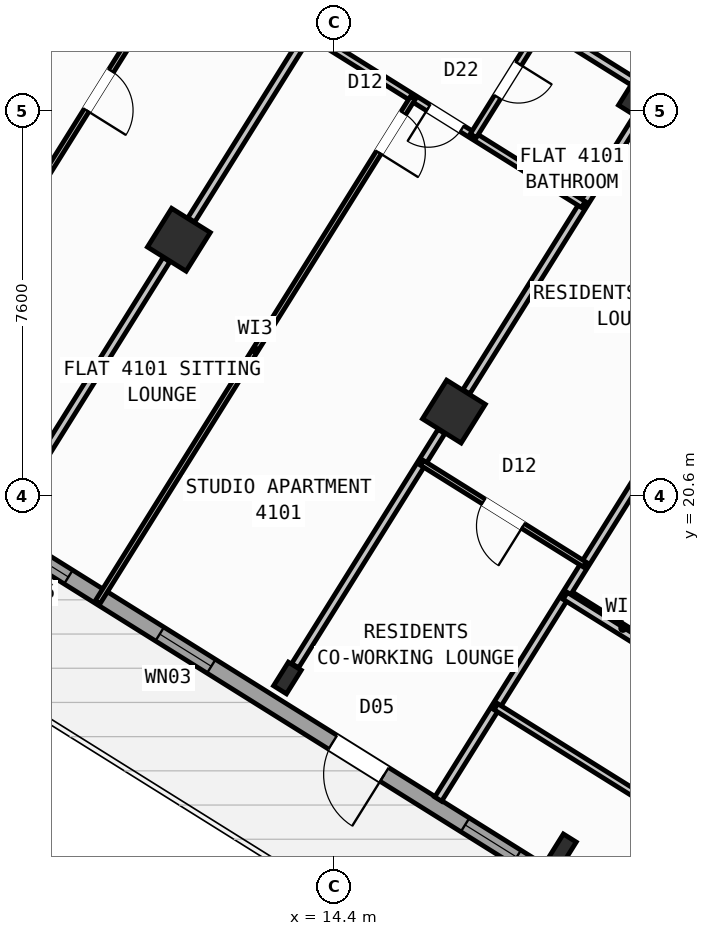
"""IFC4 building model, lengths in metres.
Left out: names, types, materials, properties, quantities, classifications, styles, units other than length and angle.
Written with IfcOpenShell. Run it as: python <this file> out.ifc"""

import sys

from ifc_helpers import new_model, si_unit, direction, frame, frame_2d, origin, origin_2d, place, context, subcontext, project, spatial, rectangle, hollow_rectangle, i_section, extrude, source, transform, mapped, element, fill, save


model = new_model("IFC4")
c1 = context("Model", 3, precision=1e-05, world=origin(), true_north=direction((0.0, 1.0)))
c2 = subcontext(c1, "Body", "Model", "MODEL_VIEW")
j1 = project(units=[si_unit("LENGTHUNIT", "METRE"), si_unit("PLANEANGLEUNIT", "RADIAN")], contexts=[c1])
p1 = place(None, origin())
s1 = spatial("IfcSite", under=j1, at=p1, CompositionType="ELEMENT")
p2 = place(p1, origin())
s2 = spatial("IfcBuilding", under=s1, at=p2, CompositionType="ELEMENT")
p3 = place(p2, frame((0.0, 0.0, 162.3)))
s3 = spatial("IfcBuildingStorey", under=s2, at=p3, CompositionType="ELEMENT", Elevation=162.3)
m1 = source(origin(), c2, "Body", "SweptSolid", [
    extrude(i_section(OverallWidth=0.3, OverallDepth=0.55, WebThickness=0.015, FlangeThickness=0.029, at=origin_2d()), origin(), (0.0, 0.0, 1.0), 3.6),
])
p4 = place(p3, frame((18.906, 13.612, 0.0), z_axis=(0.0, 0.0, 1.0), x_axis=(-0.848048096156, 0.529919264233, 0.0)))
e1 = element("IfcColumn", 1, at=p4, inside=s3, PredefinedType="COLUMN", context=c2, shape_type="MappedRepresentation", body=[
    mapped(m1, transform((0.0, 0.0, 0.0), scale=1.0)),
])
m2 = source(origin(), c2, "Body", "SweptSolid", [
    extrude(hollow_rectangle(XDim=0.9, YDim=0.9, WallThickness=0.036, at=origin_2d()), origin(), (0.0, 0.0, 1.0), 3.6),
])
for number, where, z_axis, x_axis in (
    (2, (20.632, 28.452, 0.0), (0.0, 0.0, 1.0), (-0.848, 0.53, 0.0)),
    (3, (16.764, 22.261, 0.0), (0.0, 0.0, 1.0), (-0.848, 0.53, 0.0)),
):
    element("IfcColumn", number, at=place(p3, frame(where, z_axis=z_axis, x_axis=x_axis)), inside=s3, PredefinedType="COLUMN", context=c2, shape_type="MappedRepresentation", body=[
        mapped(m2, transform((0.0, 0.0, 0.0), scale=1.0)),
    ])
p5 = place(p3, frame((13.478, 17.003, 0.0), z_axis=(0.0, 0.0, 1.0), x_axis=(-0.848048096156, 0.529919264233, 0.0)))
e4 = element("IfcColumn", 4, at=p5, inside=s3, PredefinedType="COLUMN", context=c2, shape_type="MappedRepresentation", body=[
    mapped(m1, transform((0.0, 0.0, 0.0), scale=1.0)),
])
p6 = place(p3, frame((11.336, 25.653, 0.0), z_axis=(0.0, 0.0, 1.0), x_axis=(-0.848048096156, 0.529919264233, 0.0)))
e5 = element("IfcColumn", 5, at=p6, inside=s3, PredefinedType="COLUMN", context=c2, shape_type="MappedRepresentation", body=[
    mapped(m2, transform((0.0, 0.0, 0.0), scale=1.0)),
])
p7 = place(p3, frame((29.268, 6.429, 0.0), z_axis=(0.0, 0.0, 1.0), x_axis=(-0.848049971435, 0.529916263149, 0.0)))
e6 = element("IfcWall", 6, at=p7, inside=s3, PredefinedType="STANDARD", context=c2, shape_type="SweptSolid", body=[
    extrude(rectangle(XDim=31.588, YDim=0.32, at=frame_2d((15.794, 0.0))), origin(), (0.0, 0.0, 1.0), 3.35),
])
p8 = place(p7, frame((16.362, 0.0, 0.0)))
e7 = element("IfcOpeningElement", 7, at=p8, cuts=e6, PredefinedType="OPENING", context=c2, shape_type="SweptSolid", body=[
    extrude(rectangle(XDim=1.2, YDim=2.15, at=frame_2d((0.6, 1.075))), frame((0.0, 0.17, 0.0), z_axis=(0.0, -1.0, 0.0), x_axis=(1.0, 0.0, 0.0)), (0.0, 0.0, 1.0), 0.34),
])
p9 = place(p7, frame((2.989, 0.0, 0.8)))
e8 = element("IfcOpeningElement", 8, at=p9, cuts=e6, PredefinedType="OPENING", context=c2, shape_type="SweptSolid", body=[
    extrude(rectangle(XDim=2.1, YDim=1.55, at=frame_2d((1.05, 0.775))), frame((0.0, 0.17, 0.0), z_axis=(0.0, -1.0, 0.0), x_axis=(1.0, 0.0, 0.0)), (0.0, 0.0, 1.0), 0.34),
])
p10 = place(p7, frame((8.359, 0.0, 0.8)))
e9 = element("IfcOpeningElement", 9, at=p10, cuts=e6, PredefinedType="OPENING", context=c2, shape_type="SweptSolid", body=[
    extrude(rectangle(XDim=2.1, YDim=1.55, at=frame_2d((1.05, 0.775))), frame((0.0, 0.17, 0.0), z_axis=(0.0, -1.0, 0.0), x_axis=(1.0, 0.0, 0.0)), (0.0, 0.0, 1.0), 0.34),
])
p11 = place(p7, frame((13.284, 0.0, 0.95)))
e10 = element("IfcOpeningElement", 10, at=p11, cuts=e6, PredefinedType="OPENING", context=c2, shape_type="SweptSolid", body=[
    extrude(rectangle(XDim=1.2, YDim=1.4, at=frame_2d((0.6, 0.7))), frame((0.0, 0.17, 0.0), z_axis=(0.0, -1.0, 0.0), x_axis=(1.0, 0.0, 0.0)), (0.0, 0.0, 1.0), 0.34),
])
p12 = place(p7, frame((20.39, 0.0, 0.95)))
e11 = element("IfcOpeningElement", 11, at=p12, cuts=e6, PredefinedType="OPENING", context=c2, shape_type="SweptSolid", body=[
    extrude(rectangle(XDim=1.2, YDim=1.4, at=frame_2d((0.6, 0.7))), frame((0.0, 0.17, 0.0), z_axis=(0.0, -1.0, 0.0), x_axis=(1.0, 0.0, 0.0)), (0.0, 0.0, 1.0), 0.34),
])
p13 = place(p7, frame((23.715, 0.0, 1.0)))
e12 = element("IfcOpeningElement", 12, at=p13, cuts=e6, PredefinedType="OPENING", context=c2, shape_type="SweptSolid", body=[
    extrude(rectangle(XDim=0.9, YDim=1.25, at=frame_2d((0.45, 0.625))), frame((0.0, 0.17, 0.0), z_axis=(0.0, -1.0, 0.0), x_axis=(1.0, 0.0, 0.0)), (0.0, 0.0, 1.0), 0.34),
])
p14 = place(p7, frame((26.106, 0.0, 0.85)))
e13 = element("IfcOpeningElement", 13, at=p14, cuts=e6, PredefinedType="OPENING", context=c2, shape_type="SweptSolid", body=[
    extrude(rectangle(XDim=1.5, YDim=1.5, at=frame_2d((0.75, 0.75))), frame((0.0, 0.17, 0.0), z_axis=(0.0, -1.0, 0.0), x_axis=(1.0, 0.0, 0.0)), (0.0, 0.0, 1.0), 0.34),
])
p15 = place(p7, frame((29.068, 0.0, 0.85)))
e14 = element("IfcOpeningElement", 14, at=p15, cuts=e6, PredefinedType="OPENING", context=c2, shape_type="SweptSolid", body=[
    extrude(rectangle(XDim=1.8, YDim=1.5, at=frame_2d((0.9, 0.75))), frame((0.0, 0.17, 0.0), z_axis=(0.0, -1.0, 0.0), x_axis=(1.0, 0.0, 0.0)), (0.0, 0.0, 1.0), 0.34),
])
p16 = place(p3, frame((2.415, 23.452, 0.0), z_axis=(0.0, 0.0, 1.0), x_axis=(0.52991049553, 0.848053575387, 0.0)))
e15 = element("IfcWall", 15, at=p16, inside=s3, PredefinedType="STANDARD", context=c2, shape_type="SweptSolid", body=[
    extrude(rectangle(XDim=21.587, YDim=0.32, at=frame_2d((10.794, 0.0))), origin(), (0.0, 0.0, 1.0), 2.775),
])
p17 = place(p16, frame((1.673, 0.0, 0.8)))
e16 = element("IfcOpeningElement", 16, at=p17, cuts=e15, PredefinedType="OPENING", context=c2, shape_type="SweptSolid", body=[
    extrude(rectangle(XDim=2.1, YDim=1.55, at=frame_2d((1.05, 0.775))), frame((0.0, 0.17, 0.0), z_axis=(0.0, -1.0, 0.0), x_axis=(1.0, 0.0, 0.0)), (0.0, 0.0, 1.0), 0.34),
])
p18 = place(p16, frame((8.334, 0.0, 0.85)))
e17 = element("IfcOpeningElement", 17, at=p18, cuts=e15, PredefinedType="OPENING", context=c2, shape_type="SweptSolid", body=[
    extrude(rectangle(XDim=1.8, YDim=1.5, at=frame_2d((0.9, 0.75))), frame((0.0, 0.17, 0.0), z_axis=(0.0, -1.0, 0.0), x_axis=(1.0, 0.0, 0.0)), (0.0, 0.0, 1.0), 0.34),
])
p19 = place(p16, frame((17.172, 0.0, 0.85)))
e18 = element("IfcOpeningElement", 18, at=p19, cuts=e15, PredefinedType="OPENING", context=c2, shape_type="SweptSolid", body=[
    extrude(rectangle(XDim=1.5, YDim=1.5, at=frame_2d((0.75, 0.75))), frame((0.0, 0.17, 0.0), z_axis=(0.0, -1.0, 0.0), x_axis=(1.0, 0.0, 0.0)), (0.0, 0.0, 1.0), 0.34),
])
p20 = place(p3, frame((14.138, 41.825, 0.0), z_axis=(0.0, 0.0, 1.0), x_axis=(0.848046498049, -0.529921821731, 0.0)))
e19 = element("IfcWall", 19, at=p20, inside=s3, PredefinedType="STANDARD", context=c2, shape_type="SweptSolid", body=[
    extrude(rectangle(XDim=31.588, YDim=0.32, at=frame_2d((15.794, 0.0))), origin(), (0.0, 0.0, 1.0), 3.35),
])
p21 = place(p20, frame((3.253, 0.0, 0.0)))
e20 = element("IfcOpeningElement", 20, at=p21, cuts=e19, PredefinedType="OPENING", context=c2, shape_type="SweptSolid", body=[
    extrude(rectangle(XDim=1.05, YDim=2.15, at=frame_2d((0.525, 1.075))), frame((0.0, 0.17, 0.0), z_axis=(0.0, -1.0, 0.0), x_axis=(1.0, 0.0, 0.0)), (0.0, 0.0, 1.0), 0.34),
])
p22 = place(p20, frame((0.863, 0.0, 0.85)))
e21 = element("IfcOpeningElement", 21, at=p22, cuts=e19, PredefinedType="OPENING", context=c2, shape_type="SweptSolid", body=[
    extrude(rectangle(XDim=1.8, YDim=1.5, at=frame_2d((0.9, 0.75))), frame((0.0, 0.17, 0.0), z_axis=(0.0, -1.0, 0.0), x_axis=(1.0, 0.0, 0.0)), (0.0, 0.0, 1.0), 0.34),
])
p23 = place(p20, frame((8.494, 0.0, 0.85)))
e22 = element("IfcOpeningElement", 22, at=p23, cuts=e19, PredefinedType="OPENING", context=c2, shape_type="SweptSolid", body=[
    extrude(rectangle(XDim=1.8, YDim=1.5, at=frame_2d((0.9, 0.75))), frame((0.0, 0.17, 0.0), z_axis=(0.0, -1.0, 0.0), x_axis=(1.0, 0.0, 0.0)), (0.0, 0.0, 1.0), 0.34),
])
p24 = place(p20, frame((13.874, 0.0, 0.85)))
e23 = element("IfcOpeningElement", 23, at=p24, cuts=e19, PredefinedType="OPENING", context=c2, shape_type="SweptSolid", body=[
    extrude(rectangle(XDim=1.5, YDim=1.5, at=frame_2d((0.75, 0.75))), frame((0.0, 0.17, 0.0), z_axis=(0.0, -1.0, 0.0), x_axis=(1.0, 0.0, 0.0)), (0.0, 0.0, 1.0), 0.34),
])
p25 = place(p20, frame((17.104, 0.0, 1.0)))
e24 = element("IfcOpeningElement", 24, at=p25, cuts=e19, PredefinedType="OPENING", context=c2, shape_type="SweptSolid", body=[
    extrude(rectangle(XDim=0.9, YDim=1.25, at=frame_2d((0.45, 0.625))), frame((0.0, 0.17, 0.0), z_axis=(0.0, -1.0, 0.0), x_axis=(1.0, 0.0, 0.0)), (0.0, 0.0, 1.0), 0.34),
])
p26 = place(p20, frame((22.144, 0.0, 1.0)))
e25 = element("IfcOpeningElement", 25, at=p26, cuts=e19, PredefinedType="OPENING", context=c2, shape_type="SweptSolid", body=[
    extrude(rectangle(XDim=0.9, YDim=1.25, at=frame_2d((0.45, 0.625))), frame((0.0, 0.17, 0.0), z_axis=(0.0, -1.0, 0.0), x_axis=(1.0, 0.0, 0.0)), (0.0, 0.0, 1.0), 0.34),
])
p27 = place(p20, frame((27.744, 0.0, 1.0)))
e26 = element("IfcOpeningElement", 26, at=p27, cuts=e19, PredefinedType="OPENING", context=c2, shape_type="SweptSolid", body=[
    extrude(rectangle(XDim=0.9, YDim=1.25, at=frame_2d((0.45, 0.625))), frame((0.0, 0.17, 0.0), z_axis=(0.0, -1.0, 0.0), x_axis=(1.0, 0.0, 0.0)), (0.0, 0.0, 1.0), 0.34),
])
p28 = place(p3, frame((21.206, 17.292, 0.0), z_axis=(0.0, 0.0, 1.0), x_axis=(-0.848050851465, 0.529914854792, 0.0)))
e27 = element("IfcWall", 27, at=p28, inside=s3, PredefinedType="PARTITIONING", context=c2, shape_type="SweptSolid", body=[
    extrude(rectangle(XDim=2.61, YDim=0.16, at=frame_2d((1.305, 0.0))), origin(), (0.0, 0.0, 1.0), 3.34),
])
p29 = place(p3, frame((23.899, 26.529, 0.0), z_axis=(0.0, 0.0, 1.0), x_axis=(-0.529917716469, -0.848049063305, 0.0)))
e28 = element("IfcWall", 28, at=p29, inside=s3, PredefinedType="PARTITIONING", context=c2, shape_type="SweptSolid", body=[
    extrude(rectangle(XDim=14.05, YDim=0.16, at=frame_2d((7.025, 0.0))), origin(), (0.0, 0.0, 1.0), 3.34),
])
p30 = place(p3, frame((25.065, 28.394, 0.0), z_axis=(0.0, 0.0, 1.0), x_axis=(-0.848048310262, 0.529918921593, 0.0)))
e29 = element("IfcWall", 29, at=p30, inside=s3, PredefinedType="PARTITIONING", context=c2, shape_type="SweptSolid", body=[
    extrude(rectangle(XDim=16.73, YDim=0.16, at=frame_2d((8.365, 0.0))), origin(), (0.0, 0.0, 1.0), 3.34),
])
p31 = place(p30, frame((2.22, 0.0, 0.0)))
e30 = element("IfcOpeningElement", 30, at=p31, cuts=e29, PredefinedType="OPENING", context=c2, shape_type="SweptSolid", body=[
    extrude(rectangle(XDim=0.86, YDim=2.05, at=frame_2d((0.43, 1.025))), frame((0.0, 0.09, 0.0), z_axis=(0.0, -1.0, 0.0), x_axis=(1.0, 0.0, 0.0)), (0.0, 0.0, 1.0), 0.18),
])
p32 = place(p30, frame((7.82, 0.0, 0.0)))
e31 = element("IfcOpeningElement", 31, at=p32, cuts=e29, PredefinedType="OPENING", context=c2, shape_type="SweptSolid", body=[
    extrude(rectangle(XDim=1.0, YDim=2.1, at=frame_2d((0.5, 1.05))), frame((0.0, 0.09, 0.0), z_axis=(0.0, -1.0, 0.0), x_axis=(1.0, 0.0, 0.0)), (0.0, 0.0, 1.0), 0.18),
])
p33 = place(p30, frame((12.95, 0.0, 0.0)))
e32 = element("IfcOpeningElement", 32, at=p33, cuts=e29, PredefinedType="OPENING", context=c2, shape_type="SweptSolid", body=[
    extrude(rectangle(XDim=1.0, YDim=2.1, at=frame_2d((0.5, 1.05))), frame((0.0, 0.09, 0.0), z_axis=(0.0, -1.0, 0.0), x_axis=(1.0, 0.0, 0.0)), (0.0, 0.0, 1.0), 0.18),
])
p34 = place(p3, frame((20.293, 28.782, 0.0), z_axis=(0.0, 0.0, 1.0), x_axis=(-0.848040881926, 0.529930809241, 0.0)))
e33 = element("IfcWall", 33, at=p34, inside=s3, PredefinedType="PARTITIONING", context=c2, shape_type="SweptSolid", body=[
    extrude(rectangle(XDim=5.476, YDim=0.16, at=frame_2d((2.738, 0.0))), origin(), (0.0, 0.0, 1.0), 2.775),
])
p35 = place(p34, frame((3.568, 0.0, 0.0)))
e34 = element("IfcOpeningElement", 34, at=p35, cuts=e33, PredefinedType="OPENING", context=c2, shape_type="SweptSolid", body=[
    extrude(rectangle(XDim=1.0, YDim=2.1, at=frame_2d((0.5, 1.05))), frame((0.0, 0.09, 0.0), z_axis=(0.0, -1.0, 0.0), x_axis=(1.0, 0.0, 0.0)), (0.0, 0.0, 1.0), 0.18),
])
p36 = place(p3, frame((20.387, 28.06, 0.0), z_axis=(0.0, 0.0, 1.0), x_axis=(-0.529902564924, -0.848058530814, 0.0)))
e35 = element("IfcWall", 35, at=p36, inside=s3, PredefinedType="PARTITIONING", context=c2, shape_type="SweptSolid", body=[
    extrude(rectangle(XDim=6.376, YDim=0.16, at=frame_2d((3.188, 0.0))), origin(), (0.0, 0.0, 1.0), 2.775),
])
p37 = place(p3, frame((16.519, 21.87, 0.0), z_axis=(0.0, 0.0, 1.0), x_axis=(-0.529922447305, -0.848046107144, 0.0)))
e36 = element("IfcWall", 36, at=p37, inside=s3, PredefinedType="PARTITIONING", context=c2, shape_type="SweptSolid", body=[
    extrude(rectangle(XDim=5.451, YDim=0.16, at=frame_2d((2.726, 0.0))), origin(), (0.0, 0.0, 1.0), 2.775),
])
p38 = place(p3, frame((19.346, 19.242, 0.0), z_axis=(0.0, 0.0, 1.0), x_axis=(-0.848059820872, 0.529900500304, 0.0)))
e37 = element("IfcWall", 37, at=p38, inside=s3, PredefinedType="PARTITIONING", context=c2, shape_type="SweptSolid", body=[
    extrude(rectangle(XDim=3.79, YDim=0.11, at=frame_2d((1.895, 0.0))), origin(), (0.0, 0.0, 1.0), 3.34),
])
p39 = place(p38, frame((1.435, 0.0, 0.0)))
e38 = element("IfcOpeningElement", 38, at=p39, cuts=e37, PredefinedType="OPENING", context=c2, shape_type="SweptSolid", body=[
    extrude(rectangle(XDim=0.92, YDim=2.08, at=frame_2d((0.46, 1.04))), frame((0.0, 0.065, 0.0), z_axis=(0.0, -1.0, 0.0), x_axis=(1.0, 0.0, 0.0)), (0.0, 0.0, 1.0), 0.13),
])
p40 = place(p3, frame((14.96, 31.452, 0.0), z_axis=(0.0, 0.0, 1.0), x_axis=(-0.529947310719, -0.848030570122, 0.0)))
e39 = element("IfcWall", 39, at=p40, inside=s3, PredefinedType="PARTITIONING", context=c2, shape_type="SweptSolid", body=[
    extrude(rectangle(XDim=6.376, YDim=0.16, at=frame_2d((3.188, 0.0))), origin(), (0.0, 0.0, 1.0), 2.775),
])
p41 = place(p3, frame((11.091, 25.261, 0.0), z_axis=(0.0, 0.0, 1.0), x_axis=(-0.52994257524, -0.848033529377, 0.0)))
e40 = element("IfcWall", 40, at=p41, inside=s3, PredefinedType="PARTITIONING", context=c2, shape_type="SweptSolid", body=[
    extrude(rectangle(XDim=5.451, YDim=0.16, at=frame_2d((2.726, 0.0))), origin(), (0.0, 0.0, 1.0), 2.775),
])
p42 = place(p3, frame((19.318, 26.349, 0.0), z_axis=(0.0, 0.0, 1.0), x_axis=(-0.848039019877, 0.529933789039, 0.0)))
e41 = element("IfcWall", 41, at=p42, inside=s3, PredefinedType="PLUMBINGWALL", context=c2, shape_type="SweptSolid", body=[
    extrude(rectangle(XDim=6.4, YDim=0.14, at=frame_2d((3.2, 0.0))), origin(), (0.0, 0.0, 1.0), 3.34),
])
p43 = place(p42, frame((2.824, 0.0, 0.0)))
e42 = element("IfcOpeningElement", 42, at=p43, cuts=e41, PredefinedType="OPENING", context=c2, shape_type="SweptSolid", body=[
    extrude(rectangle(XDim=0.78, YDim=2.05, at=frame_2d((0.39, 1.025))), frame((0.0, 0.08, 0.0), z_axis=(0.0, -1.0, 0.0), x_axis=(1.0, 0.0, 0.0)), (0.0, 0.0, 1.0), 0.16),
])
p44 = place(p3, frame((18.514, 29.894, 0.0), z_axis=(0.0, 0.0, 1.0), x_axis=(-0.529913878929, -0.848051461244, 0.0)))
e43 = element("IfcWall", 43, at=p44, inside=s3, PredefinedType="PLUMBINGWALL", context=c2, shape_type="SweptSolid", body=[
    extrude(rectangle(XDim=2.58, YDim=0.14, at=frame_2d((1.29, 0.0))), origin(), (0.0, 0.0, 1.0), 3.34),
])
p45 = place(p44, frame((0.9, 0.0, 0.0)))
e44 = element("IfcOpeningElement", 44, at=p45, cuts=e43, PredefinedType="OPENING", context=c2, shape_type="SweptSolid", body=[
    extrude(rectangle(XDim=0.78, YDim=2.05, at=frame_2d((0.39, 1.025))), frame((0.0, 0.08, 0.0), z_axis=(0.0, -1.0, 0.0), x_axis=(1.0, 0.0, 0.0)), (0.0, 0.0, 1.0), 0.16),
])
p46 = place(p3, frame((15.953, 28.452, 0.0), z_axis=(0.0, 0.0, 1.0), x_axis=(-0.529931645041, -0.848040359643, 0.0)))
e45 = element("IfcWall", 45, at=p46, inside=s3, PredefinedType="PARTITIONING", context=c2, shape_type="SweptSolid", body=[
    extrude(rectangle(XDim=11.74, YDim=0.11, at=frame_2d((5.87, 0.0))), origin(), (0.0, 0.0, 1.0), 3.34),
])
p47 = place(p46, frame((0.35, 0.0, 0.0)))
e46 = element("IfcOpeningElement", 46, at=p47, cuts=e45, PredefinedType="OPENING", context=c2, shape_type="SweptSolid", body=[
    extrude(rectangle(XDim=0.92, YDim=2.08, at=frame_2d((0.46, 1.04))), frame((0.0, 0.065, 0.0), z_axis=(0.0, -1.0, 0.0), x_axis=(1.0, 0.0, 0.0)), (0.0, 0.0, 1.0), 0.13),
])
p48 = place(p3, frame((12.798, 33.465, 0.0), z_axis=(0.0, 0.0, 1.0), x_axis=(-0.529916182913, -0.848050021571, 0.0)))
e47 = element("IfcWall", 47, at=p48, inside=s3, PredefinedType="PARTITIONING", context=c2, shape_type="SweptSolid", body=[
    extrude(rectangle(XDim=14.32, YDim=0.11, at=frame_2d((7.16, 0.0))), origin(), (0.0, 0.0, 1.0), 3.34),
])
p49 = place(p48, frame((0.76, 0.0, 0.0)))
e48 = element("IfcOpeningElement", 48, at=p49, cuts=e47, PredefinedType="OPENING", context=c2, shape_type="SweptSolid", body=[
    extrude(rectangle(XDim=0.78, YDim=2.05, at=frame_2d((0.39, 1.025))), frame((0.0, 0.065, 0.0), z_axis=(0.0, -1.0, 0.0), x_axis=(1.0, 0.0, 0.0)), (0.0, 0.0, 1.0), 0.13),
])
p50 = place(p48, frame((5.281, 0.0, 0.0)))
e49 = element("IfcOpeningElement", 49, at=p50, cuts=e47, PredefinedType="OPENING", context=c2, shape_type="SweptSolid", body=[
    extrude(rectangle(XDim=0.92, YDim=2.08, at=frame_2d((0.46, 1.04))), frame((0.0, 0.065, 0.0), z_axis=(0.0, -1.0, 0.0), x_axis=(1.0, 0.0, 0.0)), (0.0, 0.0, 1.0), 0.13),
])
p51 = place(p3, frame((32.164, 10.374, 0.0), z_axis=(0.0, 0.0, 1.0), x_axis=(-0.848044107957, 0.529925646633, 0.0)))
e50 = element("IfcWall", 50, at=p51, inside=s3, PredefinedType="PARTITIONING", context=c2, shape_type="SweptSolid", body=[
    extrude(rectangle(XDim=15.57, YDim=0.16, at=frame_2d((7.785, 0.0))), origin(), (0.0, 0.0, 1.0), 3.34),
])
p52 = place(p51, frame((10.83, 0.0, 0.0)))
e51 = element("IfcOpeningElement", 51, at=p52, cuts=e50, PredefinedType="OPENING", context=c2, shape_type="SweptSolid", body=[
    extrude(rectangle(XDim=1.0, YDim=2.1, at=frame_2d((0.5, 1.05))), frame((0.0, 0.09, 0.0), z_axis=(0.0, -1.0, 0.0), x_axis=(1.0, 0.0, 0.0)), (0.0, 0.0, 1.0), 0.18),
])
p53 = place(p3, frame((29.72, 8.859, 0.0), z_axis=(0.0, 0.0, 1.0), x_axis=(-0.848049134363, 0.529917602752, 0.0)))
e52 = element("IfcWall", 52, at=p53, inside=s3, PredefinedType="PLUMBINGWALL", context=c2, shape_type="SweptSolid", body=[
    extrude(rectangle(XDim=14.3, YDim=0.14, at=frame_2d((7.15, 0.0))), origin(), (0.0, 0.0, 1.0), 3.34),
])
p54 = place(p53, frame((9.57, 0.0, 0.0)))
e53 = element("IfcOpeningElement", 53, at=p54, cuts=e52, PredefinedType="OPENING", context=c2, shape_type="SweptSolid", body=[
    extrude(rectangle(XDim=0.92, YDim=2.08, at=frame_2d((0.46, 1.04))), frame((0.0, 0.08, 0.0), z_axis=(0.0, -1.0, 0.0), x_axis=(1.0, 0.0, 0.0)), (0.0, 0.0, 1.0), 0.16),
])
m3 = source(origin(), c2, "Body", "SweptSolid", [
    extrude(rectangle(XDim=1.2, YDim=2.15, at=frame_2d((0.6, 1.075))), frame((0.0, 0.025, 0.0), z_axis=(0.0, -1.0, 0.0), x_axis=(1.0, 0.0, 0.0)), (0.0, 0.0, 1.0), 0.05),
])
p55 = place(p8, origin())
e54 = element("IfcDoor", 54, at=p55, inside=s3, OperationType="SINGLE_SWING_LEFT", PredefinedType="DOOR", context=c2, shape_type="MappedRepresentation", body=[
    mapped(m3, transform((0.0, 0.0, 0.0), scale=1.0)),
])
fill(e7, e54)
m4 = source(origin(), c2, "Body", "SweptSolid", [
    extrude(rectangle(XDim=1.2, YDim=1.4, at=frame_2d((0.6, 0.7))), frame((0.0, 0.03, 0.0), z_axis=(0.0, -1.0, 0.0), x_axis=(1.0, 0.0, 0.0)), (0.0, 0.0, 1.0), 0.06),
])
p56 = place(p11, origin())
e55 = element("IfcWindow", 55, at=p56, inside=s3, PartitioningType="SINGLE_PANEL", PredefinedType="WINDOW", context=c2, shape_type="MappedRepresentation", body=[
    mapped(m4, transform((0.0, 0.0, 0.0), scale=1.0)),
])
fill(e10, e55)
p57 = place(p12, origin())
e56 = element("IfcWindow", 56, at=p57, inside=s3, PartitioningType="SINGLE_PANEL", PredefinedType="WINDOW", context=c2, shape_type="MappedRepresentation", body=[
    mapped(m4, transform((0.0, 0.0, 0.0), scale=1.0)),
])
fill(e11, e56)
m5 = source(origin(), c2, "Body", "SweptSolid", [
    extrude(rectangle(XDim=0.9, YDim=1.25, at=frame_2d((0.45, 0.625))), frame((0.0, 0.03, 0.0), z_axis=(0.0, -1.0, 0.0), x_axis=(1.0, 0.0, 0.0)), (0.0, 0.0, 1.0), 0.06),
])
p58 = place(p13, origin())
e57 = element("IfcWindow", 57, at=p58, inside=s3, PartitioningType="SINGLE_PANEL", PredefinedType="WINDOW", context=c2, shape_type="MappedRepresentation", body=[
    mapped(m5, transform((0.0, 0.0, 0.0), scale=1.0)),
])
fill(e12, e57)
m6 = source(origin(), c2, "Body", "SweptSolid", [
    extrude(rectangle(XDim=0.92, YDim=2.08, at=frame_2d((0.46, 1.04))), frame((0.0, 0.025, 0.0), z_axis=(0.0, -1.0, 0.0), x_axis=(1.0, 0.0, 0.0)), (0.0, 0.0, 1.0), 0.05),
])
p59 = place(p39, origin())
e58 = element("IfcDoor", 58, at=p59, inside=s3, OperationType="SINGLE_SWING_LEFT", PredefinedType="DOOR", context=c2, shape_type="MappedRepresentation", body=[
    mapped(m6, transform((0.0, 0.0, 0.0), scale=1.0)),
])
fill(e38, e58)
p60 = place(p47, origin())
e59 = element("IfcDoor", 59, at=p60, inside=s3, OperationType="SINGLE_SWING_RIGHT", PredefinedType="DOOR", context=c2, shape_type="MappedRepresentation", body=[
    mapped(m6, transform((0.0, 0.0, 0.0), scale=1.0)),
])
fill(e46, e59)
m7 = source(origin(), c2, "Body", "SweptSolid", [
    extrude(rectangle(XDim=0.78, YDim=2.05, at=frame_2d((0.39, 1.025))), frame((0.0, 0.025, 0.0), z_axis=(0.0, -1.0, 0.0), x_axis=(1.0, 0.0, 0.0)), (0.0, 0.0, 1.0), 0.05),
])
p61 = place(p43, origin())
e60 = element("IfcDoor", 60, at=p61, inside=s3, OperationType="SINGLE_SWING_RIGHT", PredefinedType="DOOR", context=c2, shape_type="MappedRepresentation", body=[
    mapped(m7, transform((0.0, 0.0, 0.0), scale=1.0)),
])
fill(e42, e60)
p62 = place(p45, origin())
e61 = element("IfcDoor", 61, at=p62, inside=s3, OperationType="SINGLE_SWING_LEFT", PredefinedType="DOOR", context=c2, shape_type="MappedRepresentation", body=[
    mapped(m7, transform((0.0, 0.0, 0.0), scale=1.0)),
])
fill(e44, e61)
p63 = place(p50, origin())
e62 = element("IfcDoor", 62, at=p63, inside=s3, OperationType="SINGLE_SWING_RIGHT", PredefinedType="DOOR", context=c2, shape_type="MappedRepresentation", body=[
    mapped(m6, transform((0.0, 0.0, 0.0), scale=1.0)),
])
fill(e49, e62)
save(model, sys.argv[1])
